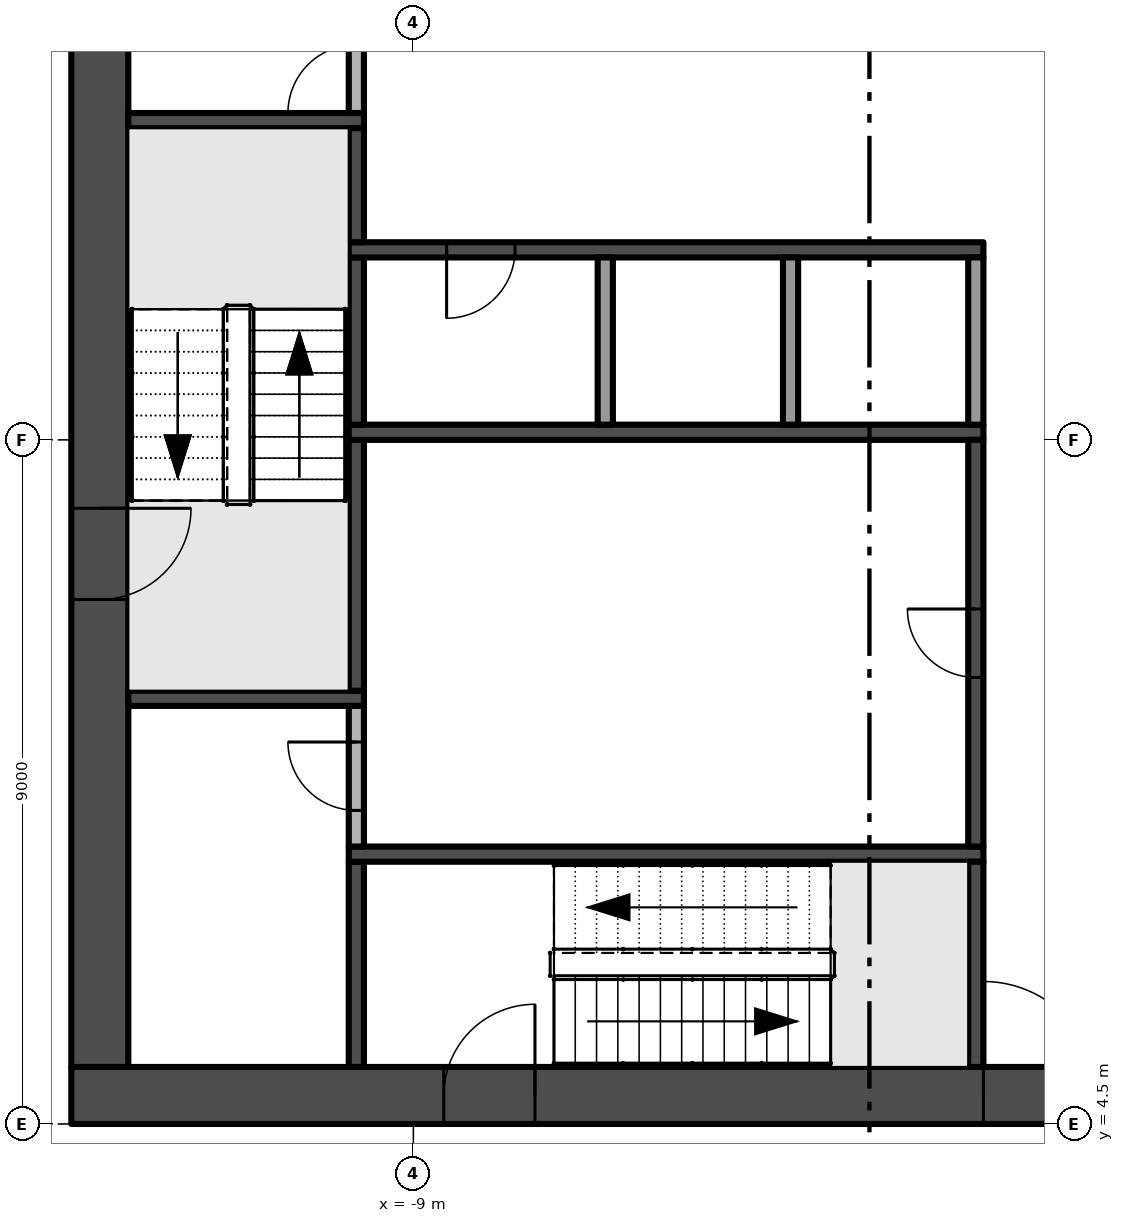
"""IFC4 building model, lengths in metres.
Left out: names, types, materials, properties, quantities, classifications, styles, units other than length and angle.
Written with IfcOpenShell. Run it as: python <this file> out.ifc"""

import sys

from ifc_helpers import new_model, si_unit, direction, frame, frame_2d, origin, place, context, subcontext, project, spatial, rectangle, extrude, element, fill, save


model = new_model("IFC4")
c1 = context("Model", 3, precision=1e-05, world=origin(), true_north=direction((0.0, 1.0)))
c2 = subcontext(c1, "Body", "Model", "MODEL_VIEW")
j1 = project(units=[si_unit("LENGTHUNIT", "METRE"), si_unit("PLANEANGLEUNIT", "RADIAN")], contexts=[c1])
p1 = place(None, origin())
s1 = spatial("IfcSite", under=j1, at=p1, CompositionType="ELEMENT")
p2 = place(p1, origin())
s2 = spatial("IfcBuilding", under=s1, at=p2, CompositionType="ELEMENT")
p3 = place(p2, frame((0.0, 0.0, 120.0)))
s3 = spatial("IfcBuildingStorey", under=s2, at=p3, CompositionType="ELEMENT", Elevation=120.0)
p4 = place(p3, frame((-13.5, 4.875, -0.3), z_axis=(0.0, 0.0, 1.0), x_axis=(1.0, 0.0, 0.0)))
e1 = element("IfcWall", 1, at=p4, inside=s3, PredefinedType="SHEAR", context=c2, shape_type="SweptSolid", body=[
    extrude(rectangle(XDim=27.0, YDim=0.75, at=frame_2d((13.5, 0.0))), origin(), (0.0, 0.0, 1.0), 5.0),
])
p5 = place(p4, frame((12.0, 0.0, 0.3)))
e2 = element("IfcOpeningElement", 2, at=p5, cuts=e1, PredefinedType="OPENING", context=c2, shape_type="SweptSolid", body=[
    extrude(rectangle(XDim=3.0, YDim=2.4, at=frame_2d((1.5, 1.2))), frame((0.0, 0.385, 0.0), z_axis=(0.0, -1.0, 0.0), x_axis=(1.0, 0.0, 0.0)), (0.0, 0.0, 1.0), 0.77),
])
p6 = place(p4, frame((4.9, 0.0, 0.3)))
e3 = element("IfcOpeningElement", 3, at=p6, cuts=e1, PredefinedType="OPENING", context=c2, shape_type="SweptSolid", body=[
    extrude(rectangle(XDim=1.2, YDim=2.2, at=frame_2d((0.6, 1.1))), frame((0.0, 0.385, 0.0), z_axis=(0.0, -1.0, 0.0), x_axis=(1.0, 0.0, 0.0)), (0.0, 0.0, 1.0), 0.77),
])
p7 = place(p4, frame((20.75, 0.0, 0.3)))
e4 = element("IfcOpeningElement", 4, at=p7, cuts=e1, PredefinedType="OPENING", context=c2, shape_type="SweptSolid", body=[
    extrude(rectangle(XDim=1.5, YDim=2.2, at=frame_2d((0.75, 1.1))), frame((0.0, 0.385, 0.0), z_axis=(0.0, -1.0, 0.0), x_axis=(1.0, 0.0, 0.0)), (0.0, 0.0, 1.0), 0.77),
])
p8 = place(p4, frame((17.4, 0.0, 0.3)))
e5 = element("IfcOpeningElement", 5, at=p8, cuts=e1, PredefinedType="OPENING", context=c2, shape_type="SweptSolid", body=[
    extrude(rectangle(XDim=1.2, YDim=2.2, at=frame_2d((0.6, 1.1))), frame((0.0, 0.385, 0.0), z_axis=(0.0, -1.0, 0.0), x_axis=(1.0, 0.0, 0.0)), (0.0, 0.0, 1.0), 0.77),
])
p9 = place(p3, frame((-13.125, 21.75, -0.3), z_axis=(0.0, 0.0, 1.0), x_axis=(0.0, -1.0, 0.0)))
e6 = element("IfcWall", 6, at=p9, inside=s3, PredefinedType="SHEAR", context=c2, shape_type="SweptSolid", body=[
    extrude(rectangle(XDim=16.5, YDim=0.75, at=frame_2d((8.25, 0.0))), origin(), (0.0, 0.0, 1.0), 5.0),
])
p10 = place(p9, frame((9.15, 0.0, 0.3)))
e7 = element("IfcOpeningElement", 7, at=p10, cuts=e6, PredefinedType="OPENING", context=c2, shape_type="SweptSolid", body=[
    extrude(rectangle(XDim=1.2, YDim=2.2, at=frame_2d((0.6, 1.1))), frame((0.0, 0.385, 0.0), z_axis=(0.0, -1.0, 0.0), x_axis=(1.0, 0.0, 0.0)), (0.0, 0.0, 1.0), 0.77),
])
for number, where, z_axis, x_axis in (
    (8, (-12.75, 10.1, 0.0), (0.0, 0.0, 1.0), (1.0, 0.0, 0.0)),
    (9, (-12.75, 17.7, 0.0), (0.0, 0.0, 1.0), (1.0, 0.0, 0.0)),
):
    element("IfcWall", number, at=place(p3, frame(where, z_axis=z_axis, x_axis=x_axis)), inside=s3, PredefinedType="SHEAR", context=c2, shape_type="SweptSolid", body=[
        extrude(rectangle(XDim=3.1, YDim=0.2, at=frame_2d((1.55, 0.0))), origin(), (0.0, 0.0, 1.0), 4.7),
    ])
p11 = place(p3, frame((-9.75, 5.25, 0.0), z_axis=(0.0, 0.0, 1.0), x_axis=(0.0, 1.0, 0.0)))
e10 = element("IfcWall", 10, at=p11, inside=s3, PredefinedType="SHEAR", context=c2, shape_type="SweptSolid", body=[
    extrude(rectangle(XDim=2.7, YDim=0.2, at=frame_2d((1.35, 0.0))), origin(), (0.0, 0.0, 1.0), 4.7),
])
p12 = place(p3, frame((-9.85, 8.05, 0.0), z_axis=(0.0, 0.0, 1.0), x_axis=(1.0, 0.0, 0.0)))
e11 = element("IfcWall", 11, at=p12, inside=s3, PredefinedType="SHEAR", context=c2, shape_type="SweptSolid", body=[
    extrude(rectangle(XDim=8.35, YDim=0.2, at=frame_2d((4.175, 0.0))), origin(), (0.0, 0.0, 1.0), 4.7),
])
p13 = place(p3, frame((-9.75, 8.15, 0.0), z_axis=(0.0, 0.0, 1.0), x_axis=(0.0, 1.0, 0.0)))
e12 = element("IfcWall", 12, at=p13, inside=s3, PredefinedType="PARTITIONING", context=c2, shape_type="SweptSolid", body=[
    extrude(rectangle(XDim=1.85, YDim=0.2, at=frame_2d((0.925, 0.0))), origin(), (0.0, 0.0, 1.0), 4.7),
])
p14 = place(p13, frame((0.475, 0.0, 0.0)))
e13 = element("IfcOpeningElement", 13, at=p14, cuts=e12, PredefinedType="OPENING", context=c2, shape_type="SweptSolid", body=[
    extrude(rectangle(XDim=0.9, YDim=2.1, at=frame_2d((0.45, 1.05))), frame((0.0, 0.11, 0.0), z_axis=(0.0, -1.0, 0.0), x_axis=(1.0, 0.0, 0.0)), (0.0, 0.0, 1.0), 0.22),
])
p15 = place(p3, frame((-9.75, 10.2, 0.0), z_axis=(0.0, 0.0, 1.0), x_axis=(0.0, 1.0, 0.0)))
e14 = element("IfcWall", 14, at=p15, inside=s3, PredefinedType="SHEAR", context=c2, shape_type="SweptSolid", body=[
    extrude(rectangle(XDim=3.3, YDim=0.2, at=frame_2d((1.65, 0.0))), origin(), (0.0, 0.0, 1.0), 4.7),
])
p16 = place(p3, frame((-9.85, 13.6, 0.0), z_axis=(0.0, 0.0, 1.0), x_axis=(1.0, 0.0, 0.0)))
e15 = element("IfcWall", 15, at=p16, inside=s3, PredefinedType="SHEAR", context=c2, shape_type="SweptSolid", body=[
    extrude(rectangle(XDim=8.35, YDim=0.2, at=frame_2d((4.175, 0.0))), origin(), (0.0, 0.0, 1.0), 4.7),
])
p17 = place(p3, frame((-9.75, 13.7, 0.0), z_axis=(0.0, 0.0, 1.0), x_axis=(0.0, 1.0, 0.0)))
e16 = element("IfcWall", 16, at=p17, inside=s3, PredefinedType="SHEAR", context=c2, shape_type="SweptSolid", body=[
    extrude(rectangle(XDim=2.2, YDim=0.2, at=frame_2d((1.1, 0.0))), origin(), (0.0, 0.0, 1.0), 4.7),
])
p18 = place(p3, frame((-1.5, 16.0, 0.0), z_axis=(0.0, 0.0, 1.0), x_axis=(-1.0, 0.0, 0.0)))
e17 = element("IfcWall", 17, at=p18, inside=s3, PredefinedType="SHEAR", context=c2, shape_type="SweptSolid", body=[
    extrude(rectangle(XDim=8.35, YDim=0.2, at=frame_2d((4.175, 0.0))), origin(), (0.0, 0.0, 1.0), 4.7),
])
p19 = place(p18, frame((6.162, 0.0, 0.0)))
e18 = element("IfcOpeningElement", 18, at=p19, cuts=e17, PredefinedType="OPENING", context=c2, shape_type="SweptSolid", body=[
    extrude(rectangle(XDim=0.9, YDim=2.1, at=frame_2d((0.45, 1.05))), frame((0.0, 0.11, 0.0), z_axis=(0.0, -1.0, 0.0), x_axis=(1.0, 0.0, 0.0)), (0.0, 0.0, 1.0), 0.22),
])
p20 = place(p3, frame((-9.75, 16.1, 0.0), z_axis=(0.0, 0.0, 1.0), x_axis=(0.0, 1.0, 0.0)))
e19 = element("IfcWall", 19, at=p20, inside=s3, PredefinedType="SHEAR", context=c2, shape_type="SweptSolid", body=[
    extrude(rectangle(XDim=1.5, YDim=0.2, at=frame_2d((0.75, 0.0))), origin(), (0.0, 0.0, 1.0), 4.7),
])
p21 = place(p3, frame((-9.75, 17.8, 0.0), z_axis=(0.0, 0.0, 1.0), x_axis=(0.0, 1.0, 0.0)))
e20 = element("IfcWall", 20, at=p21, inside=s3, PredefinedType="PARTITIONING", context=c2, shape_type="SweptSolid", body=[
    extrude(rectangle(XDim=1.4, YDim=0.2, at=frame_2d((0.7, 0.0))), origin(), (0.0, 0.0, 1.0), 4.7),
])
p22 = place(p21, origin())
e21 = element("IfcOpeningElement", 21, at=p22, cuts=e20, PredefinedType="OPENING", context=c2, shape_type="SweptSolid", body=[
    extrude(rectangle(XDim=0.9, YDim=2.1, at=frame_2d((0.45, 1.05))), frame((0.0, 0.11, 0.0), z_axis=(0.0, -1.0, 0.0), x_axis=(1.0, 0.0, 0.0)), (0.0, 0.0, 1.0), 0.22),
])
for number, where, z_axis, x_axis in (
    (22, (-6.475, 13.7, 0.0), (0.0, 0.0, 1.0), (0.0, 1.0, 0.0)),
    (23, (-4.037, 13.7, 0.0), (0.0, 0.0, 1.0), (0.0, 1.0, 0.0)),
):
    element("IfcWall", number, at=place(p3, frame(where, z_axis=z_axis, x_axis=x_axis)), inside=s3, PredefinedType="PARTITIONING", context=c2, shape_type="SweptSolid", body=[
        extrude(rectangle(XDim=2.2, YDim=0.2, at=frame_2d((1.1, 0.0))), origin(), (0.0, 0.0, 1.0), 4.7),
    ])
p23 = place(p3, frame((-1.6, 5.25, 0.0), z_axis=(0.0, 0.0, 1.0), x_axis=(0.0, 1.0, 0.0)))
e24 = element("IfcWall", 24, at=p23, inside=s3, PredefinedType="SHEAR", context=c2, shape_type="SweptSolid", body=[
    extrude(rectangle(XDim=2.7, YDim=0.2, at=frame_2d((1.35, 0.0))), origin(), (0.0, 0.0, 1.0), 4.7),
])
p24 = place(p3, frame((-1.6, 8.15, 0.0), z_axis=(0.0, 0.0, 1.0), x_axis=(0.0, 1.0, 0.0)))
e25 = element("IfcWall", 25, at=p24, inside=s3, PredefinedType="SHEAR", context=c2, shape_type="SweptSolid", body=[
    extrude(rectangle(XDim=5.35, YDim=0.2, at=frame_2d((2.675, 0.0))), origin(), (0.0, 0.0, 1.0), 4.7),
])
p25 = place(p24, frame((2.225, 0.0, 0.0)))
e26 = element("IfcOpeningElement", 26, at=p25, cuts=e25, PredefinedType="OPENING", context=c2, shape_type="SweptSolid", body=[
    extrude(rectangle(XDim=0.9, YDim=2.1, at=frame_2d((0.45, 1.05))), frame((0.0, 0.11, 0.0), z_axis=(0.0, -1.0, 0.0), x_axis=(1.0, 0.0, 0.0)), (0.0, 0.0, 1.0), 0.22),
])
p26 = place(p3, frame((-1.6, 13.7, 0.0), z_axis=(0.0, 0.0, 1.0), x_axis=(0.0, 1.0, 0.0)))
e27 = element("IfcWall", 27, at=p26, inside=s3, PredefinedType="PARTITIONING", context=c2, shape_type="SweptSolid", body=[
    extrude(rectangle(XDim=2.2, YDim=0.2, at=frame_2d((1.1, 0.0))), origin(), (0.0, 0.0, 1.0), 4.7),
])
p27 = place(p5, frame((3.0, 0.0, 0.0), z_axis=(0.0, 0.0, 1.0), x_axis=(-1.0, 0.0, 0.0)))
e28 = element("IfcDoor", 28, at=p27, inside=s3, OperationType="DOUBLE_DOOR_SINGLE_SWING", PredefinedType="DOOR", context=c2, shape_type="SweptSolid", body=[
    extrude(rectangle(XDim=3.0, YDim=2.4, at=frame_2d((1.5, 1.2))), frame((0.0, 0.025, 0.0), z_axis=(0.0, -1.0, 0.0), x_axis=(1.0, 0.0, 0.0)), (0.0, 0.0, 1.0), 0.05),
])
fill(e2, e28)
p28 = place(p10, frame((1.2, 0.0, 0.0), z_axis=(0.0, 0.0, 1.0), x_axis=(-1.0, 0.0, 0.0)))
e29 = element("IfcDoor", 29, at=p28, inside=s3, OperationType="SINGLE_SWING_RIGHT", PredefinedType="DOOR", context=c2, shape_type="SweptSolid", body=[
    extrude(rectangle(XDim=1.2, YDim=2.2, at=frame_2d((0.6, 1.1))), frame((0.0, 0.025, 0.0), z_axis=(0.0, -1.0, 0.0), x_axis=(1.0, 0.0, 0.0)), (0.0, 0.0, 1.0), 0.05),
])
fill(e7, e29)
p29 = place(p6, frame((1.2, 0.0, 0.0), z_axis=(0.0, 0.0, 1.0), x_axis=(-1.0, 0.0, 0.0)))
e30 = element("IfcDoor", 30, at=p29, inside=s3, OperationType="SINGLE_SWING_LEFT", PredefinedType="DOOR", context=c2, shape_type="SweptSolid", body=[
    extrude(rectangle(XDim=1.2, YDim=2.2, at=frame_2d((0.6, 1.1))), frame((0.0, 0.025, 0.0), z_axis=(0.0, -1.0, 0.0), x_axis=(1.0, 0.0, 0.0)), (0.0, 0.0, 1.0), 0.05),
])
fill(e3, e30)
p30 = place(p25, origin())
e31 = element("IfcDoor", 31, at=p30, inside=s3, OperationType="SINGLE_SWING_RIGHT", PredefinedType="DOOR", context=c2, shape_type="SweptSolid", body=[
    extrude(rectangle(XDim=0.9, YDim=2.1, at=frame_2d((0.45, 1.05))), frame((0.0, 0.025, 0.0), z_axis=(0.0, -1.0, 0.0), x_axis=(1.0, 0.0, 0.0)), (0.0, 0.0, 1.0), 0.05),
])
fill(e26, e31)
p31 = place(p19, origin())
e32 = element("IfcDoor", 32, at=p31, inside=s3, OperationType="SINGLE_SWING_RIGHT", PredefinedType="DOOR", context=c2, shape_type="SweptSolid", body=[
    extrude(rectangle(XDim=0.9, YDim=2.1, at=frame_2d((0.45, 1.05))), frame((0.0, 0.025, 0.0), z_axis=(0.0, -1.0, 0.0), x_axis=(1.0, 0.0, 0.0)), (0.0, 0.0, 1.0), 0.05),
])
fill(e18, e32)
p32 = place(p22, origin())
e33 = element("IfcDoor", 33, at=p32, inside=s3, OperationType="SINGLE_SWING_LEFT", PredefinedType="DOOR", context=c2, shape_type="SweptSolid", body=[
    extrude(rectangle(XDim=0.9, YDim=2.1, at=frame_2d((0.45, 1.05))), frame((0.0, 0.025, 0.0), z_axis=(0.0, -1.0, 0.0), x_axis=(1.0, 0.0, 0.0)), (0.0, 0.0, 1.0), 0.05),
])
fill(e21, e33)
p33 = place(p14, origin())
e34 = element("IfcDoor", 34, at=p33, inside=s3, OperationType="SINGLE_SWING_RIGHT", PredefinedType="DOOR", context=c2, shape_type="SweptSolid", body=[
    extrude(rectangle(XDim=0.9, YDim=2.1, at=frame_2d((0.45, 1.05))), frame((0.0, 0.025, 0.0), z_axis=(0.0, -1.0, 0.0), x_axis=(1.0, 0.0, 0.0)), (0.0, 0.0, 1.0), 0.05),
])
fill(e13, e34)
save(model, sys.argv[1])
